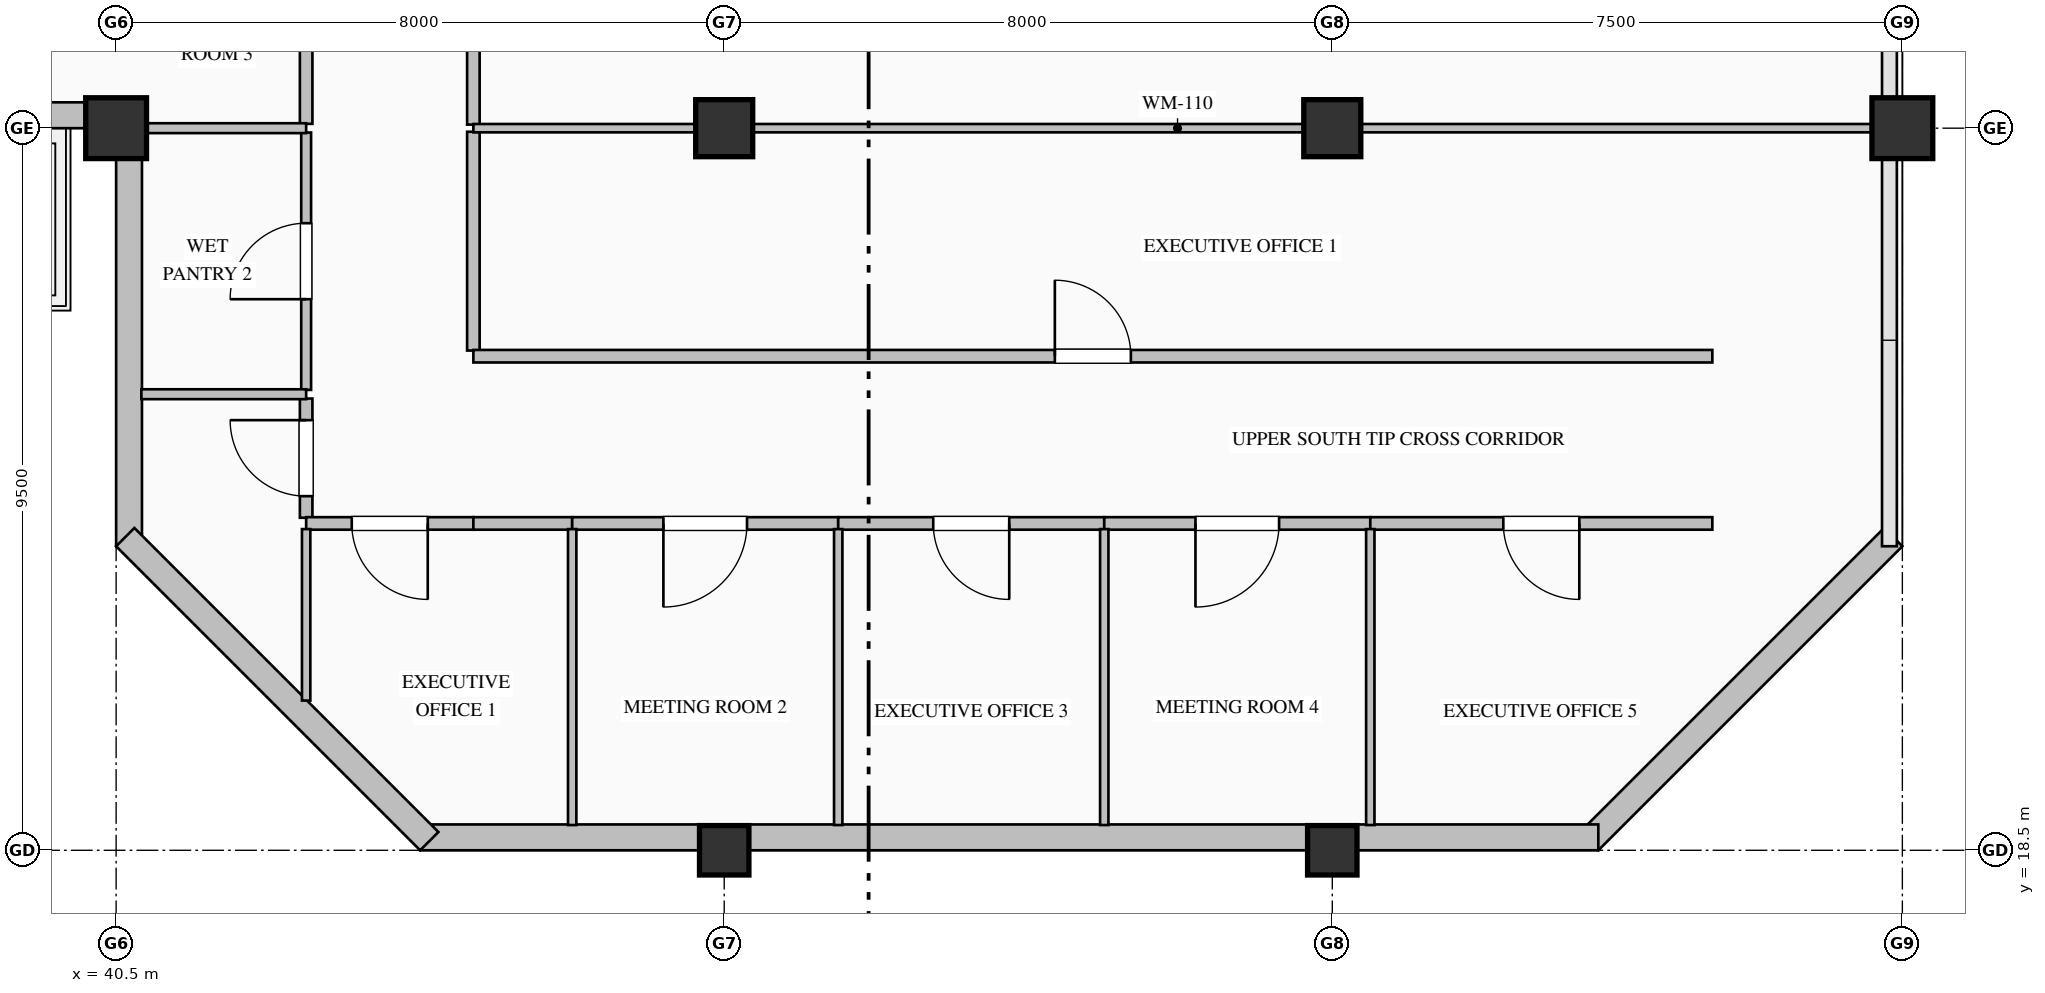
"""IFC4 building model, lengths in metres.
Left out: names, types, materials, properties, quantities, classifications, styles, units other than length and angle.
Written with IfcOpenShell. Run it as: python <this file> out.ifc"""

import sys

from ifc_helpers import new_model, si_unit, direction, frame, frame_2d, origin, origin_2d, place, context, subcontext, project, spatial, rectangle, hollow_rectangle, extrude, element, fill, save


model = new_model("IFC4")
c1 = context("Model", 3, precision=1e-05, world=origin(), true_north=direction((0.0, 1.0)))
c2 = subcontext(c1, "Body", "Model", "MODEL_VIEW")
j1 = project(units=[si_unit("LENGTHUNIT", "METRE"), si_unit("PLANEANGLEUNIT", "RADIAN")], contexts=[c1])
p1 = place(None, origin())
s1 = spatial("IfcSite", under=j1, at=p1, CompositionType="ELEMENT")
p2 = place(p1, origin())
s2 = spatial("IfcBuilding", under=s1, at=p2, CompositionType="ELEMENT")
p3 = place(p2, frame((0.0, 0.0, 295.2)))
s3 = spatial("IfcBuildingStorey", under=s2, at=p3, CompositionType="ELEMENT", Elevation=295.2)
p4 = place(p3, frame((40.5, 28.0, 0.0), z_axis=(0.0, 0.0, 1.0), x_axis=(1.0, 0.0, 0.0)))
e1 = element("IfcColumn", 1, at=p4, inside=s3, PredefinedType="COLUMN", context=c2, shape_type="SweptSolid", body=[
    extrude(hollow_rectangle(XDim=0.8, YDim=0.8, WallThickness=0.032, at=origin_2d()), origin(), (0.0, 0.0, 1.0), 4.0),
])
p5 = place(p3, frame((48.5, 18.5, 0.0), z_axis=(0.0, 0.0, 1.0), x_axis=(1.0, 0.0, 0.0)))
e2 = element("IfcColumn", 2, at=p5, inside=s3, PredefinedType="COLUMN", context=c2, shape_type="SweptSolid", body=[
    extrude(hollow_rectangle(XDim=0.65, YDim=0.65, WallThickness=0.028, at=origin_2d()), origin(), (0.0, 0.0, 1.0), 4.0),
])
p6 = place(p3, frame((48.5, 28.0, 0.0), z_axis=(0.0, 0.0, 1.0), x_axis=(1.0, 0.0, 0.0)))
e3 = element("IfcColumn", 3, at=p6, inside=s3, PredefinedType="COLUMN", context=c2, shape_type="SweptSolid", body=[
    extrude(rectangle(XDim=0.75, YDim=0.75, at=origin_2d()), origin(), (0.0, 0.0, 1.0), 4.0),
])
p7 = place(p3, frame((56.5, 18.5, 0.0), z_axis=(0.0, 0.0, 1.0), x_axis=(1.0, 0.0, 0.0)))
e4 = element("IfcColumn", 4, at=p7, inside=s3, PredefinedType="COLUMN", context=c2, shape_type="SweptSolid", body=[
    extrude(hollow_rectangle(XDim=0.65, YDim=0.65, WallThickness=0.028, at=origin_2d()), origin(), (0.0, 0.0, 1.0), 4.0),
])
p8 = place(p3, frame((56.5, 28.0, 0.0), z_axis=(0.0, 0.0, 1.0), x_axis=(1.0, 0.0, 0.0)))
e5 = element("IfcColumn", 5, at=p8, inside=s3, PredefinedType="COLUMN", context=c2, shape_type="SweptSolid", body=[
    extrude(rectangle(XDim=0.75, YDim=0.75, at=origin_2d()), origin(), (0.0, 0.0, 1.0), 4.0),
])
p9 = place(p3, frame((64.0, 28.0, 0.0), z_axis=(0.0, 0.0, 1.0), x_axis=(1.0, 0.0, 0.0)))
e6 = element("IfcColumn", 6, at=p9, inside=s3, PredefinedType="COLUMN", context=c2, shape_type="SweptSolid", body=[
    extrude(hollow_rectangle(XDim=0.8, YDim=0.8, WallThickness=0.032, at=origin_2d()), origin(), (0.0, 0.0, 1.0), 4.0),
])
p10 = place(p3, frame((40.67, 22.5, 0.0), z_axis=(0.0, 0.0, 1.0), x_axis=(0.0, 1.0, 0.0)))
e7 = element("IfcWall", 7, at=p10, inside=s3, PredefinedType="SOLIDWALL", context=c2, shape_type="SweptSolid", body=[
    extrude(rectangle(XDim=5.84, YDim=0.34, at=frame_2d((2.92, 0.0))), origin(), (0.0, 0.0, 1.0), 3.185),
])
p11 = place(p3, frame((40.52, 28.17, 0.0), z_axis=(0.0, 0.0, 1.0), x_axis=(-1.0, 0.0, 0.0)))
e8 = element("IfcWall", 8, at=p11, inside=s3, PredefinedType="SOLIDWALL", context=c2, shape_type="SweptSolid", body=[
    extrude(rectangle(XDim=20.02, YDim=0.34, at=frame_2d((10.01, 0.0))), origin(), (0.0, 0.0, 1.0), 3.185),
])
p12 = place(p11, frame((3.125, 0.0, 0.9)))
e9 = element("IfcOpeningElement", 9, at=p12, cuts=e8, PredefinedType="OPENING", context=c2, shape_type="SweptSolid", body=[
    extrude(rectangle(XDim=0.95, YDim=1.85, at=frame_2d((0.475, 0.925))), frame((0.0, 0.18, 0.0), z_axis=(0.0, -1.0, 0.0), x_axis=(1.0, 0.0, 0.0)), (0.0, 0.0, 1.0), 0.36),
])
p13 = place(p11, frame((13.925, 0.0, 0.9)))
e10 = element("IfcOpeningElement", 10, at=p13, cuts=e8, PredefinedType="OPENING", context=c2, shape_type="SweptSolid", body=[
    extrude(rectangle(XDim=0.95, YDim=1.85, at=frame_2d((0.475, 0.925))), frame((0.0, 0.18, 0.0), z_axis=(0.0, -1.0, 0.0), x_axis=(1.0, 0.0, 0.0)), (0.0, 0.0, 1.0), 0.36),
])
p14 = place(p11, frame((11.395, 0.0, 0.0)))
e11 = element("IfcOpeningElement", 11, at=p14, cuts=e8, PredefinedType="OPENING", context=c2, shape_type="SweptSolid", body=[
    extrude(rectangle(XDim=1.25, YDim=2.25, at=frame_2d((0.625, 1.125))), frame((0.0, 0.18, 0.0), z_axis=(0.0, -1.0, 0.0), x_axis=(1.0, 0.0, 0.0)), (0.0, 0.0, 1.0), 0.36),
])
p15 = place(p3, frame((63.88, 22.62, 0.0), z_axis=(0.0, 0.0, 1.0), x_axis=(-0.707106781187, -0.707106781187, 0.0)))
e12 = element("IfcWall", 12, at=p15, inside=s3, PredefinedType="SOLIDWALL", context=c2, shape_type="SweptSolid", body=[
    extrude(rectangle(XDim=5.657, YDim=0.34, at=frame_2d((2.828, 0.0))), origin(), (0.0, 0.0, 1.0), 3.785),
])
p16 = place(p3, frame((60.0, 18.67, 0.0), z_axis=(0.0, 0.0, 1.0), x_axis=(-1.0, 0.0, 0.0)))
e13 = element("IfcWall", 13, at=p16, inside=s3, PredefinedType="SOLIDWALL", context=c2, shape_type="SweptSolid", body=[
    extrude(rectangle(XDim=15.5, YDim=0.34, at=frame_2d((7.75, 0.0))), origin(), (0.0, 0.0, 1.0), 3.335),
])
p17 = place(p3, frame((44.62, 18.62, 0.0), z_axis=(0.0, 0.0, 1.0), x_axis=(-0.707106781187, 0.707106781187, 0.0)))
e14 = element("IfcWall", 14, at=p17, inside=s3, PredefinedType="SOLIDWALL", context=c2, shape_type="SweptSolid", body=[
    extrude(rectangle(XDim=5.657, YDim=0.34, at=frame_2d((2.828, 0.0))), origin(), (0.0, 0.0, 1.0), 3.785),
])
p18 = place(p3, frame((45.2, 27.953, 0.0), z_axis=(0.0, 0.0, 1.0), x_axis=(0.0, -1.0, 0.0)))
e15 = element("IfcWall", 15, at=p18, inside=s3, PredefinedType="PARTITIONING", context=c2, shape_type="SweptSolid", body=[
    extrude(rectangle(XDim=2.878, YDim=0.165, at=frame_2d((1.439, 0.0))), origin(), (0.0, 0.0, 1.0), 3.785),
])
p19 = place(p3, frame((45.2, 31.753, 0.0), z_axis=(0.0, 0.0, 1.0), x_axis=(0.0, -1.0, 0.0)))
e16 = element("IfcWall", 16, at=p19, inside=s3, PredefinedType="PARTITIONING", context=c2, shape_type="SweptSolid", body=[
    extrude(rectangle(XDim=3.706, YDim=0.165, at=frame_2d((1.853, 0.0))), origin(), (0.0, 0.0, 1.0), 3.785),
])
p20 = place(p19, frame((1.303, 0.0, 0.0)))
e17 = element("IfcOpeningElement", 17, at=p20, cuts=e16, PredefinedType="OPENING", context=c2, shape_type="SweptSolid", body=[
    extrude(rectangle(XDim=1.1, YDim=2.2, at=frame_2d((0.55, 1.1))), frame((0.0, 0.093, 0.0), z_axis=(0.0, -1.0, 0.0), x_axis=(1.0, 0.0, 0.0)), (0.0, 0.0, 1.0), 0.185),
])
p21 = place(p3, frame((43.0, 22.875, 0.0), z_axis=(0.0, 0.0, 1.0), x_axis=(0.0, 1.0, 0.0)))
e18 = element("IfcWall", 18, at=p21, inside=s3, PredefinedType="PARTITIONING", context=c2, shape_type="SweptSolid", body=[
    extrude(rectangle(XDim=1.569, YDim=0.165, at=frame_2d((0.784, 0.0))), origin(), (0.0, 0.0, 1.0), 3.785),
])
p22 = place(p21, frame((0.284, 0.0, 0.0)))
e19 = element("IfcOpeningElement", 19, at=p22, cuts=e18, PredefinedType="OPENING", context=c2, shape_type="SweptSolid", body=[
    extrude(rectangle(XDim=1.0, YDim=2.15, at=frame_2d((0.5, 1.075))), frame((0.0, 0.093, 0.0), z_axis=(0.0, -1.0, 0.0), x_axis=(1.0, 0.0, 0.0)), (0.0, 0.0, 1.0), 0.185),
])
p23 = place(p3, frame((43.0, 24.557, 0.0), z_axis=(0.0, 0.0, 1.0), x_axis=(0.0, 1.0, 0.0)))
e20 = element("IfcWall", 20, at=p23, inside=s3, PredefinedType="PARTITIONING", context=c2, shape_type="SweptSolid", body=[
    extrude(rectangle(XDim=3.386, YDim=0.13, at=frame_2d((1.693, 0.0))), origin(), (0.0, 0.0, 1.0), 3.785),
])
p24 = place(p23, frame((1.193, 0.0, 0.0)))
e21 = element("IfcOpeningElement", 21, at=p24, cuts=e20, PredefinedType="OPENING", context=c2, shape_type="SweptSolid", body=[
    extrude(rectangle(XDim=1.0, YDim=2.15, at=frame_2d((0.5, 1.075))), frame((0.0, 0.075, 0.0), z_axis=(0.0, -1.0, 0.0), x_axis=(1.0, 0.0, 0.0)), (0.0, 0.0, 1.0), 0.15),
])
p25 = place(p3, frame((43.0, 28.057, 0.0), z_axis=(0.0, 0.0, 1.0), x_axis=(0.0, 1.0, 0.0)))
e22 = element("IfcWall", 22, at=p25, inside=s3, PredefinedType="PARTITIONING", context=c2, shape_type="SweptSolid", body=[
    extrude(rectangle(XDim=5.469, YDim=0.165, at=frame_2d((2.734, 0.0))), origin(), (0.0, 0.0, 1.0), 3.785),
])
p26 = place(p25, frame((2.234, 0.0, 0.0)))
e23 = element("IfcOpeningElement", 23, at=p26, cuts=e22, PredefinedType="OPENING", context=c2, shape_type="SweptSolid", body=[
    extrude(rectangle(XDim=1.0, YDim=2.15, at=frame_2d((0.5, 1.075))), frame((0.0, 0.093, 0.0), z_axis=(0.0, -1.0, 0.0), x_axis=(1.0, 0.0, 0.0)), (0.0, 0.0, 1.0), 0.185),
])
p27 = place(p3, frame((45.2, 22.8, 0.0), z_axis=(0.0, 0.0, 1.0), x_axis=(-1.0, 0.0, 0.0)))
e24 = element("IfcWall", 24, at=p27, inside=s3, PredefinedType="PARTITIONING", context=c2, shape_type="SweptSolid", body=[
    extrude(rectangle(XDim=2.2, YDim=0.165, at=frame_2d((1.1, 0.0))), origin(), (0.0, 0.0, 1.0), 3.785),
])
p28 = place(p27, frame((0.6, 0.0, 0.0)))
e25 = element("IfcOpeningElement", 25, at=p28, cuts=e24, PredefinedType="OPENING", context=c2, shape_type="SweptSolid", body=[
    extrude(rectangle(XDim=1.0, YDim=2.15, at=frame_2d((0.5, 1.075))), frame((0.0, 0.093, 0.0), z_axis=(0.0, -1.0, 0.0), x_axis=(1.0, 0.0, 0.0)), (0.0, 0.0, 1.0), 0.185),
])
p29 = place(p3, frame((45.2, 25.0, 0.0), z_axis=(0.0, 0.0, 1.0), x_axis=(1.0, 0.0, 0.0)))
e26 = element("IfcWall", 26, at=p29, inside=s3, PredefinedType="PARTITIONING", context=c2, shape_type="SweptSolid", body=[
    extrude(rectangle(XDim=16.3, YDim=0.165, at=frame_2d((8.15, 0.0))), origin(), (0.0, 0.0, 1.0), 3.785),
])
p30 = place(p29, frame((7.65, 0.0, 0.0)))
e27 = element("IfcOpeningElement", 27, at=p30, cuts=e26, PredefinedType="OPENING", context=c2, shape_type="SweptSolid", body=[
    extrude(rectangle(XDim=1.0, YDim=2.15, at=frame_2d((0.5, 1.075))), frame((0.0, 0.093, 0.0), z_axis=(0.0, -1.0, 0.0), x_axis=(1.0, 0.0, 0.0)), (0.0, 0.0, 1.0), 0.185),
])
p31 = place(p3, frame((46.5, 22.8, 0.0), z_axis=(0.0, 0.0, 1.0), x_axis=(-1.0, 0.0, 0.0)))
e28 = element("IfcWall", 28, at=p31, inside=s3, PredefinedType="PARTITIONING", context=c2, shape_type="SweptSolid", body=[
    extrude(rectangle(XDim=1.3, YDim=0.165, at=frame_2d((0.65, 0.0))), origin(), (0.0, 0.0, 1.0), 3.785),
])
p32 = place(p3, frame((50.0, 22.8, 0.0), z_axis=(0.0, 0.0, 1.0), x_axis=(-1.0, 0.0, 0.0)))
e29 = element("IfcWall", 29, at=p32, inside=s3, PredefinedType="PARTITIONING", context=c2, shape_type="SweptSolid", body=[
    extrude(rectangle(XDim=3.5, YDim=0.165, at=frame_2d((1.75, 0.0))), origin(), (0.0, 0.0, 1.0), 3.785),
])
p33 = place(p32, frame((1.2, 0.0, 0.0)))
e30 = element("IfcOpeningElement", 30, at=p33, cuts=e29, PredefinedType="OPENING", context=c2, shape_type="SweptSolid", body=[
    extrude(rectangle(XDim=1.1, YDim=2.2, at=frame_2d((0.55, 1.1))), frame((0.0, 0.093, 0.0), z_axis=(0.0, -1.0, 0.0), x_axis=(1.0, 0.0, 0.0)), (0.0, 0.0, 1.0), 0.185),
])
p34 = place(p3, frame((53.5, 22.8, 0.0), z_axis=(0.0, 0.0, 1.0), x_axis=(-1.0, 0.0, 0.0)))
e31 = element("IfcWall", 31, at=p34, inside=s3, PredefinedType="PARTITIONING", context=c2, shape_type="SweptSolid", body=[
    extrude(rectangle(XDim=3.5, YDim=0.165, at=frame_2d((1.75, 0.0))), origin(), (0.0, 0.0, 1.0), 3.785),
])
p35 = place(p34, frame((1.25, 0.0, 0.0)))
e32 = element("IfcOpeningElement", 32, at=p35, cuts=e31, PredefinedType="OPENING", context=c2, shape_type="SweptSolid", body=[
    extrude(rectangle(XDim=1.0, YDim=2.15, at=frame_2d((0.5, 1.075))), frame((0.0, 0.093, 0.0), z_axis=(0.0, -1.0, 0.0), x_axis=(1.0, 0.0, 0.0)), (0.0, 0.0, 1.0), 0.185),
])
p36 = place(p3, frame((57.0, 22.8, 0.0), z_axis=(0.0, 0.0, 1.0), x_axis=(-1.0, 0.0, 0.0)))
e33 = element("IfcWall", 33, at=p36, inside=s3, PredefinedType="PARTITIONING", context=c2, shape_type="SweptSolid", body=[
    extrude(rectangle(XDim=3.5, YDim=0.165, at=frame_2d((1.75, 0.0))), origin(), (0.0, 0.0, 1.0), 3.785),
])
p37 = place(p36, frame((1.2, 0.0, 0.0)))
e34 = element("IfcOpeningElement", 34, at=p37, cuts=e33, PredefinedType="OPENING", context=c2, shape_type="SweptSolid", body=[
    extrude(rectangle(XDim=1.1, YDim=2.2, at=frame_2d((0.55, 1.1))), frame((0.0, 0.093, 0.0), z_axis=(0.0, -1.0, 0.0), x_axis=(1.0, 0.0, 0.0)), (0.0, 0.0, 1.0), 0.185),
])
p38 = place(p3, frame((61.5, 22.8, 0.0), z_axis=(0.0, 0.0, 1.0), x_axis=(-1.0, 0.0, 0.0)))
e35 = element("IfcWall", 35, at=p38, inside=s3, PredefinedType="PARTITIONING", context=c2, shape_type="SweptSolid", body=[
    extrude(rectangle(XDim=4.5, YDim=0.165, at=frame_2d((2.25, 0.0))), origin(), (0.0, 0.0, 1.0), 3.785),
])
p39 = place(p38, frame((1.75, 0.0, 0.0)))
e36 = element("IfcOpeningElement", 36, at=p39, cuts=e35, PredefinedType="OPENING", context=c2, shape_type="SweptSolid", body=[
    extrude(rectangle(XDim=1.0, YDim=2.15, at=frame_2d((0.5, 1.075))), frame((0.0, 0.093, 0.0), z_axis=(0.0, -1.0, 0.0), x_axis=(1.0, 0.0, 0.0)), (0.0, 0.0, 1.0), 0.185),
])
p40 = place(p3, frame((45.2, 28.0, 0.0), z_axis=(0.0, 0.0, 1.0), x_axis=(1.0, 0.0, 0.0)))
e37 = element("IfcWall", 37, at=p40, inside=s3, PredefinedType="MOVABLE", context=c2, shape_type="SweptSolid", body=[
    extrude(rectangle(XDim=18.528, YDim=0.11, at=frame_2d((9.264, 0.0))), origin(), (0.0, 0.0, 1.0), 3.177),
])
p41 = place(p3, frame((40.832, 24.5, 0.0), z_axis=(0.0, 0.0, 1.0), x_axis=(1.0, 0.0, 0.0)))
e38 = element("IfcWall", 38, at=p41, inside=s3, PredefinedType="PARTITIONING", context=c2, shape_type="SweptSolid", body=[
    extrude(rectangle(XDim=2.168, YDim=0.13, at=frame_2d((1.084, 0.0))), origin(), (0.0, 0.0, 1.0), 3.785),
])
p42 = place(p3, frame((43.0, 22.726, 0.0), z_axis=(0.0, 0.0, 1.0), x_axis=(0.0, -1.0, 0.0)))
e39 = element("IfcWall", 39, at=p42, inside=s3, PredefinedType="MOVABLE", context=c2, shape_type="SweptSolid", body=[
    extrude(rectangle(XDim=2.256, YDim=0.11, at=frame_2d((1.128, 0.0))), origin(), (0.0, 0.0, 1.0), 3.785),
])
p43 = place(p3, frame((40.832, 28.0, 0.0), z_axis=(0.0, 0.0, 1.0), x_axis=(1.0, 0.0, 0.0)))
e40 = element("IfcWall", 40, at=p43, inside=s3, PredefinedType="PARTITIONING", context=c2, shape_type="SweptSolid", body=[
    extrude(rectangle(XDim=2.168, YDim=0.13, at=frame_2d((1.084, 0.0))), origin(), (0.0, 0.0, 1.0), 3.177),
])
for number, where, z_axis, x_axis in (
    (41, (46.5, 22.726, 0.0), (0.0, 0.0, 1.0), (0.0, -1.0, 0.0)),
    (42, (50.0, 22.726, 0.0), (0.0, 0.0, 1.0), (0.0, -1.0, 0.0)),
    (43, (53.5, 22.726, 0.0), (0.0, 0.0, 1.0), (0.0, -1.0, 0.0)),
    (44, (57.0, 22.726, 0.0), (0.0, 0.0, 1.0), (0.0, -1.0, 0.0)),
):
    element("IfcWall", number, at=place(p3, frame(where, z_axis=z_axis, x_axis=x_axis)), inside=s3, PredefinedType="MOVABLE", context=c2, shape_type="SweptSolid", body=[
        extrude(rectangle(XDim=3.894, YDim=0.11, at=frame_2d((1.947, 0.0))), origin(), (0.0, 0.0, 1.0), 3.785),
    ])
p44 = place(p30, origin())
e45 = element("IfcDoor", 45, at=p44, inside=s3, OperationType="SINGLE_SWING_LEFT", PredefinedType="DOOR", context=c2, shape_type="SweptSolid", body=[
    extrude(rectangle(XDim=1.0, YDim=2.15, at=frame_2d((0.5, 1.075))), frame((0.0, 0.025, 0.0), z_axis=(0.0, -1.0, 0.0), x_axis=(1.0, 0.0, 0.0)), (0.0, 0.0, 1.0), 0.05),
])
fill(e27, e45)
p45 = place(p22, origin())
e46 = element("IfcDoor", 46, at=p45, inside=s3, OperationType="SINGLE_SWING_RIGHT", PredefinedType="DOOR", context=c2, shape_type="SweptSolid", body=[
    extrude(rectangle(XDim=1.0, YDim=2.15, at=frame_2d((0.5, 1.075))), frame((0.0, 0.025, 0.0), z_axis=(0.0, -1.0, 0.0), x_axis=(1.0, 0.0, 0.0)), (0.0, 0.0, 1.0), 0.05),
])
fill(e19, e46)
p46 = place(p24, origin())
e47 = element("IfcDoor", 47, at=p46, inside=s3, OperationType="SINGLE_SWING_LEFT", PredefinedType="DOOR", context=c2, shape_type="SweptSolid", body=[
    extrude(rectangle(XDim=1.0, YDim=2.15, at=frame_2d((0.5, 1.075))), frame((0.0, 0.025, 0.0), z_axis=(0.0, -1.0, 0.0), x_axis=(1.0, 0.0, 0.0)), (0.0, 0.0, 1.0), 0.05),
])
fill(e21, e47)
p47 = place(p28, origin())
e48 = element("IfcDoor", 48, at=p47, inside=s3, OperationType="SINGLE_SWING_LEFT", PredefinedType="DOOR", context=c2, shape_type="SweptSolid", body=[
    extrude(rectangle(XDim=1.0, YDim=2.15, at=frame_2d((0.5, 1.075))), frame((0.0, 0.025, 0.0), z_axis=(0.0, -1.0, 0.0), x_axis=(1.0, 0.0, 0.0)), (0.0, 0.0, 1.0), 0.05),
])
fill(e25, e48)
p48 = place(p33, origin())
e49 = element("IfcDoor", 49, at=p48, inside=s3, OperationType="SINGLE_SWING_RIGHT", PredefinedType="DOOR", context=c2, shape_type="SweptSolid", body=[
    extrude(rectangle(XDim=1.1, YDim=2.2, at=frame_2d((0.55, 1.1))), frame((0.0, 0.025, 0.0), z_axis=(0.0, -1.0, 0.0), x_axis=(1.0, 0.0, 0.0)), (0.0, 0.0, 1.0), 0.05),
])
fill(e30, e49)
p49 = place(p35, origin())
e50 = element("IfcDoor", 50, at=p49, inside=s3, OperationType="SINGLE_SWING_LEFT", PredefinedType="DOOR", context=c2, shape_type="SweptSolid", body=[
    extrude(rectangle(XDim=1.0, YDim=2.15, at=frame_2d((0.5, 1.075))), frame((0.0, 0.025, 0.0), z_axis=(0.0, -1.0, 0.0), x_axis=(1.0, 0.0, 0.0)), (0.0, 0.0, 1.0), 0.05),
])
fill(e32, e50)
p50 = place(p37, origin())
e51 = element("IfcDoor", 51, at=p50, inside=s3, OperationType="SINGLE_SWING_RIGHT", PredefinedType="DOOR", context=c2, shape_type="SweptSolid", body=[
    extrude(rectangle(XDim=1.1, YDim=2.2, at=frame_2d((0.55, 1.1))), frame((0.0, 0.025, 0.0), z_axis=(0.0, -1.0, 0.0), x_axis=(1.0, 0.0, 0.0)), (0.0, 0.0, 1.0), 0.05),
])
fill(e34, e51)
p51 = place(p39, origin())
e52 = element("IfcDoor", 52, at=p51, inside=s3, OperationType="SINGLE_SWING_LEFT", PredefinedType="DOOR", context=c2, shape_type="SweptSolid", body=[
    extrude(rectangle(XDim=1.0, YDim=2.15, at=frame_2d((0.5, 1.075))), frame((0.0, 0.025, 0.0), z_axis=(0.0, -1.0, 0.0), x_axis=(1.0, 0.0, 0.0)), (0.0, 0.0, 1.0), 0.05),
])
fill(e36, e52)
save(model, sys.argv[1])
